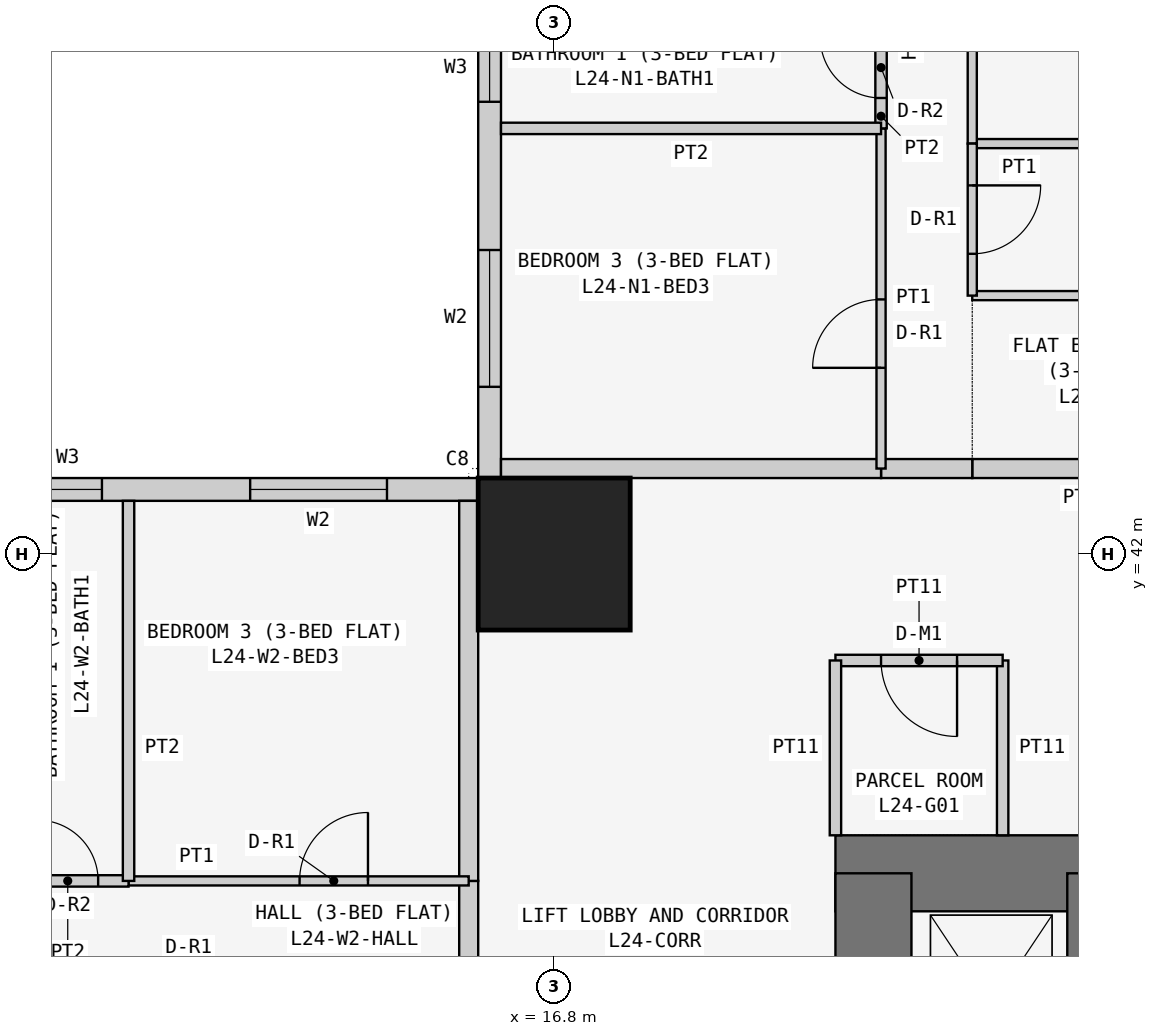
"""IFC4 building model, lengths in metres.
Left out: names, types, materials, properties, quantities, classifications, styles, units other than length and angle.
Written with IfcOpenShell. Run it as: python <this file> out.ifc"""

import sys

from ifc_helpers import new_model, si_unit, direction, frame, frame_2d, origin, origin_2d, place, context, subcontext, project, spatial, rectangle, extrude, element, fill, save


model = new_model("IFC4")
c1 = context("Model", 3, precision=1e-05, world=origin(), true_north=direction((0.0, 1.0)))
c2 = subcontext(c1, "Body", "Model", "MODEL_VIEW")
j1 = project(units=[si_unit("LENGTHUNIT", "METRE"), si_unit("PLANEANGLEUNIT", "RADIAN")], contexts=[c1])
p1 = place(None, origin())
s1 = spatial("IfcSite", under=j1, at=p1, CompositionType="ELEMENT")
p2 = place(p1, origin())
s2 = spatial("IfcBuilding", under=s1, at=p2, CompositionType="ELEMENT")
p3 = place(p2, frame((0.0, 0.0, 95.7)))
s3 = spatial("IfcBuildingStorey", under=s2, at=p3, CompositionType="ELEMENT", Elevation=95.7)
p4 = place(p3, frame((16.8, 42.0, 0.0), z_axis=(0.0, 0.0, 1.0), x_axis=(1.0, 0.0, 0.0)))
e1 = element("IfcColumn", 1, at=p4, inside=s3, PredefinedType="COLUMN", context=c2, shape_type="SweptSolid", body=[
    extrude(rectangle(XDim=2.0, YDim=2.0, at=origin_2d()), origin(), (0.0, 0.0, 1.0), 3.6),
])
p5 = place(p3, frame((37.8, 37.8, 0.0), z_axis=(0.0, 0.0, 1.0), x_axis=(-1.0, 0.0, 0.0)))
e2 = element("IfcWall", 2, at=p5, inside=s3, PredefinedType="SHEAR", context=c2, shape_type="SweptSolid", body=[
    extrude(rectangle(XDim=17.3, YDim=1.0, at=frame_2d((8.65, 0.0))), origin(), (0.0, 0.0, 1.0), 3.6),
])
p6 = place(p3, frame((21.0, 37.8, 0.0), z_axis=(0.0, 0.0, 1.0), x_axis=(0.0, -1.0, 0.0)))
e3 = element("IfcWall", 3, at=p6, inside=s3, PredefinedType="SHEAR", context=c2, shape_type="SweptSolid", body=[
    extrude(rectangle(XDim=17.3, YDim=1.0, at=frame_2d((8.65, 0.0))), origin(), (0.0, 0.0, 1.0), 3.6),
])
p7 = place(p6, frame((5.4, 0.0, 0.0)))
e4 = element("IfcOpeningElement", 4, at=p7, cuts=e3, PredefinedType="OPENING", context=c2, shape_type="SweptSolid", body=[
    extrude(rectangle(XDim=1.2, YDim=2.1, at=frame_2d((0.6, 1.05))), frame((0.0, 0.51, 0.0), z_axis=(0.0, -1.0, 0.0), x_axis=(1.0, 0.0, 0.0)), (0.0, 0.0, 1.0), 1.02),
])
p8 = place(p3, frame((23.8, 34.6, 0.0), z_axis=(0.0, 0.0, 1.0), x_axis=(0.0, 1.0, 0.0)))
e5 = element("IfcWall", 5, at=p8, inside=s3, PredefinedType="SHEAR", context=c2, shape_type="SweptSolid", body=[
    extrude(rectangle(XDim=3.2, YDim=0.5, at=frame_2d((1.6, 0.0))), origin(), (0.0, 0.0, 1.0), 3.6),
])
p9 = place(p3, frame((15.8, 42.85, 0.0), z_axis=(0.0, 0.0, 1.0), x_axis=(-1.0, 0.0, 0.0)))
e6 = element("IfcWall", 6, at=p9, inside=s3, PredefinedType="SOLIDWALL", context=c2, shape_type="SweptSolid", body=[
    extrude(rectangle(XDim=15.4, YDim=0.3, at=frame_2d((7.7, 0.0))), origin(), (0.0, 0.0, 1.0), 3.45),
])
p10 = place(p9, frame((1.2, 0.0, 0.9)))
e7 = element("IfcOpeningElement", 7, at=p10, cuts=e6, PredefinedType="OPENING", context=c2, shape_type="SweptSolid", body=[
    extrude(rectangle(XDim=1.8, YDim=1.5, at=frame_2d((0.9, 0.75))), frame((0.0, 0.16, 0.0), z_axis=(0.0, -1.0, 0.0), x_axis=(1.0, 0.0, 0.0)), (0.0, 0.0, 1.0), 0.32),
])
p11 = place(p9, frame((4.95, 0.0, 1.5)))
e8 = element("IfcOpeningElement", 8, at=p11, cuts=e6, PredefinedType="OPENING", context=c2, shape_type="SweptSolid", body=[
    extrude(rectangle(XDim=0.9, YDim=0.7, at=frame_2d((0.45, 0.35))), frame((0.0, 0.16, 0.0), z_axis=(0.0, -1.0, 0.0), x_axis=(1.0, 0.0, 0.0)), (0.0, 0.0, 1.0), 0.32),
])
p12 = place(p9, frame((8.5, 0.0, 0.9)))
e9 = element("IfcOpeningElement", 9, at=p12, cuts=e6, PredefinedType="OPENING", context=c2, shape_type="SweptSolid", body=[
    extrude(rectangle(XDim=1.8, YDim=1.5, at=frame_2d((0.9, 0.75))), frame((0.0, 0.16, 0.0), z_axis=(0.0, -1.0, 0.0), x_axis=(1.0, 0.0, 0.0)), (0.0, 0.0, 1.0), 0.32),
])
p13 = place(p9, frame((12.5, 0.0, 0.0)))
e10 = element("IfcOpeningElement", 10, at=p13, cuts=e6, PredefinedType="OPENING", context=c2, shape_type="SweptSolid", body=[
    extrude(rectangle(XDim=0.9, YDim=2.4, at=frame_2d((0.45, 1.2))), frame((0.0, 0.16, 0.0), z_axis=(0.0, -1.0, 0.0), x_axis=(1.0, 0.0, 0.0)), (0.0, 0.0, 1.0), 0.32),
])
p14 = place(p9, frame((13.5, 0.0, 0.9)))
e11 = element("IfcOpeningElement", 11, at=p14, cuts=e6, PredefinedType="OPENING", context=c2, shape_type="SweptSolid", body=[
    extrude(rectangle(XDim=1.2, YDim=1.5, at=frame_2d((0.6, 0.75))), frame((0.0, 0.16, 0.0), z_axis=(0.0, -1.0, 0.0), x_axis=(1.0, 0.0, 0.0)), (0.0, 0.0, 1.0), 0.32),
])
p15 = place(p3, frame((15.95, 58.4, 0.0), z_axis=(0.0, 0.0, 1.0), x_axis=(0.0, -1.0, 0.0)))
e12 = element("IfcWall", 12, at=p15, inside=s3, PredefinedType="SOLIDWALL", context=c2, shape_type="SweptSolid", body=[
    extrude(rectangle(XDim=15.7, YDim=0.3, at=frame_2d((7.85, 0.0))), origin(), (0.0, 0.0, 1.0), 3.45),
])
p16 = place(p15, frame((12.4, 0.0, 0.9)))
e13 = element("IfcOpeningElement", 13, at=p16, cuts=e12, PredefinedType="OPENING", context=c2, shape_type="SweptSolid", body=[
    extrude(rectangle(XDim=1.8, YDim=1.5, at=frame_2d((0.9, 0.75))), frame((0.0, 0.16, 0.0), z_axis=(0.0, -1.0, 0.0), x_axis=(1.0, 0.0, 0.0)), (0.0, 0.0, 1.0), 0.32),
])
p17 = place(p15, frame((9.55, 0.0, 1.5)))
e14 = element("IfcOpeningElement", 14, at=p17, cuts=e12, PredefinedType="OPENING", context=c2, shape_type="SweptSolid", body=[
    extrude(rectangle(XDim=0.9, YDim=0.7, at=frame_2d((0.45, 0.35))), frame((0.0, 0.16, 0.0), z_axis=(0.0, -1.0, 0.0), x_axis=(1.0, 0.0, 0.0)), (0.0, 0.0, 1.0), 0.32),
])
p18 = place(p15, frame((5.1, 0.0, 0.9)))
e15 = element("IfcOpeningElement", 15, at=p18, cuts=e12, PredefinedType="OPENING", context=c2, shape_type="SweptSolid", body=[
    extrude(rectangle(XDim=1.8, YDim=1.5, at=frame_2d((0.9, 0.75))), frame((0.0, 0.16, 0.0), z_axis=(0.0, -1.0, 0.0), x_axis=(1.0, 0.0, 0.0)), (0.0, 0.0, 1.0), 0.32),
])
p19 = place(p15, frame((2.0, 0.0, 0.0)))
e16 = element("IfcOpeningElement", 16, at=p19, cuts=e12, PredefinedType="OPENING", context=c2, shape_type="SweptSolid", body=[
    extrude(rectangle(XDim=0.9, YDim=2.4, at=frame_2d((0.45, 1.2))), frame((0.0, 0.16, 0.0), z_axis=(0.0, -1.0, 0.0), x_axis=(1.0, 0.0, 0.0)), (0.0, 0.0, 1.0), 0.32),
])
p20 = place(p15, frame((0.7, 0.0, 0.9)))
e17 = element("IfcOpeningElement", 17, at=p20, cuts=e12, PredefinedType="OPENING", context=c2, shape_type="SweptSolid", body=[
    extrude(rectangle(XDim=1.2, YDim=1.5, at=frame_2d((0.6, 0.75))), frame((0.0, 0.16, 0.0), z_axis=(0.0, -1.0, 0.0), x_axis=(1.0, 0.0, 0.0)), (0.0, 0.0, 1.0), 0.32),
])
p21 = place(p3, frame((22.7, 38.3, 0.0), z_axis=(0.0, 0.0, 1.0), x_axis=(0.0, 1.0, 0.0)))
e18 = element("IfcWall", 18, at=p21, inside=s3, PredefinedType="PARTITIONING", context=c2, shape_type="SweptSolid", body=[
    extrude(rectangle(XDim=2.3, YDim=0.15, at=frame_2d((1.15, 0.0))), origin(), (0.0, 0.0, 1.0), 3.45),
])
p22 = place(p3, frame((22.7, 40.6, 0.0), z_axis=(0.0, 0.0, 1.0), x_axis=(-1.0, 0.0, 0.0)))
e19 = element("IfcWall", 19, at=p22, inside=s3, PredefinedType="PARTITIONING", context=c2, shape_type="SweptSolid", body=[
    extrude(rectangle(XDim=2.2, YDim=0.15, at=frame_2d((1.1, 0.0))), origin(), (0.0, 0.0, 1.0), 3.45),
])
p23 = place(p22, frame((0.6, 0.0, 0.0)))
e20 = element("IfcOpeningElement", 20, at=p23, cuts=e19, PredefinedType="OPENING", context=c2, shape_type="SweptSolid", body=[
    extrude(rectangle(XDim=1.0, YDim=2.1, at=frame_2d((0.5, 1.05))), frame((0.0, 0.085, 0.0), z_axis=(0.0, -1.0, 0.0), x_axis=(1.0, 0.0, 0.0)), (0.0, 0.0, 1.0), 0.17),
])
p24 = place(p3, frame((20.5, 40.6, 0.0), z_axis=(0.0, 0.0, 1.0), x_axis=(0.0, -1.0, 0.0)))
e21 = element("IfcWall", 21, at=p24, inside=s3, PredefinedType="PARTITIONING", context=c2, shape_type="SweptSolid", body=[
    extrude(rectangle(XDim=2.3, YDim=0.15, at=frame_2d((1.15, 0.0))), origin(), (0.0, 0.0, 1.0), 3.45),
])
p25 = place(p3, frame((22.3, 43.125, 0.0), z_axis=(0.0, 0.0, 1.0), x_axis=(1.0, 0.0, 0.0)))
e22 = element("IfcWall", 22, at=p25, inside=s3, PredefinedType="PARTITIONING", context=c2, shape_type="SweptSolid", body=[
    extrude(rectangle(XDim=7.1, YDim=0.25, at=frame_2d((3.55, 0.0))), origin(), (0.0, 0.0, 1.0), 3.45),
])
p26 = place(p25, frame((4.05, 0.0, 0.0)))
e23 = element("IfcOpeningElement", 23, at=p26, cuts=e22, PredefinedType="OPENING", context=c2, shape_type="SweptSolid", body=[
    extrude(rectangle(XDim=1.0, YDim=2.1, at=frame_2d((0.5, 1.05))), frame((0.0, 0.135, 0.0), z_axis=(0.0, -1.0, 0.0), x_axis=(1.0, 0.0, 0.0)), (0.0, 0.0, 1.0), 0.27),
])
p27 = place(p3, frame((21.1, 43.125, 0.0), z_axis=(0.0, 0.0, 1.0), x_axis=(1.0, 0.0, 0.0)))
e24 = element("IfcWall", 24, at=p27, inside=s3, PredefinedType="PARTITIONING", context=c2, shape_type="SweptSolid", body=[
    extrude(rectangle(XDim=1.2, YDim=0.25, at=frame_2d((0.6, 0.0))), origin(), (0.0, 0.0, 1.0), 3.45),
])
p28 = place(p3, frame((16.1, 43.125, 0.0), z_axis=(0.0, 0.0, 1.0), x_axis=(1.0, 0.0, 0.0)))
e25 = element("IfcWall", 25, at=p28, inside=s3, PredefinedType="PARTITIONING", context=c2, shape_type="SweptSolid", body=[
    extrude(rectangle(XDim=5.0, YDim=0.25, at=frame_2d((2.5, 0.0))), origin(), (0.0, 0.0, 1.0), 3.45),
])
p29 = place(p3, frame((15.675, 36.5, 0.0), z_axis=(0.0, 0.0, 1.0), x_axis=(0.0, 1.0, 0.0)))
e26 = element("IfcWall", 26, at=p29, inside=s3, PredefinedType="PARTITIONING", context=c2, shape_type="SweptSolid", body=[
    extrude(rectangle(XDim=1.2, YDim=0.25, at=frame_2d((0.6, 0.0))), origin(), (0.0, 0.0, 1.0), 3.45),
])
p30 = place(p3, frame((15.675, 37.7, 0.0), z_axis=(0.0, 0.0, 1.0), x_axis=(0.0, 1.0, 0.0)))
e27 = element("IfcWall", 27, at=p30, inside=s3, PredefinedType="PARTITIONING", context=c2, shape_type="SweptSolid", body=[
    extrude(rectangle(XDim=5.0, YDim=0.25, at=frame_2d((2.5, 0.0))), origin(), (0.0, 0.0, 1.0), 3.45),
])
for number, where, z_axis, x_axis in (
    (28, (25.4, 45.4, 0.0), (0.0, 0.0, 1.0), (-1.0, 0.0, 0.0)),
    (29, (25.4, 47.4, 0.0), (0.0, 0.0, 1.0), (-1.0, 0.0, 0.0)),
):
    element("IfcWall", number, at=place(p3, frame(where, z_axis=z_axis, x_axis=x_axis)), inside=s3, PredefinedType="PARTITIONING", context=c2, shape_type="SweptSolid", body=[
        extrude(rectangle(XDim=3.1, YDim=0.12, at=frame_2d((1.55, 0.0))), origin(), (0.0, 0.0, 1.0), 3.45),
    ])
p31 = place(p3, frame((22.3, 47.4, 0.0), z_axis=(0.0, 0.0, 1.0), x_axis=(0.0, 1.0, 0.0)))
e30 = element("IfcWall", 30, at=p31, inside=s3, PredefinedType="PARTITIONING", context=c2, shape_type="SweptSolid", body=[
    extrude(rectangle(XDim=3.0, YDim=0.12, at=frame_2d((1.5, 0.0))), origin(), (0.0, 0.0, 1.0), 3.45),
])
p32 = place(p3, frame((22.3, 47.4, 0.0), z_axis=(0.0, 0.0, 1.0), x_axis=(0.0, -1.0, 0.0)))
e31 = element("IfcWall", 31, at=p32, inside=s3, PredefinedType="PARTITIONING", context=c2, shape_type="SweptSolid", body=[
    extrude(rectangle(XDim=2.0, YDim=0.12, at=frame_2d((1.0, 0.0))), origin(), (0.0, 0.0, 1.0), 3.45),
])
p33 = place(p32, frame((0.55, 0.0, 0.0)))
e32 = element("IfcOpeningElement", 32, at=p33, cuts=e31, PredefinedType="OPENING", context=c2, shape_type="SweptSolid", body=[
    extrude(rectangle(XDim=0.9, YDim=2.1, at=frame_2d((0.45, 1.05))), frame((0.0, 0.07, 0.0), z_axis=(0.0, -1.0, 0.0), x_axis=(1.0, 0.0, 0.0)), (0.0, 0.0, 1.0), 0.14),
])
p34 = place(p3, frame((21.1, 47.6, 0.0), z_axis=(0.0, 0.0, 1.0), x_axis=(0.0, -1.0, 0.0)))
e33 = element("IfcWall", 33, at=p34, inside=s3, PredefinedType="PARTITIONING", context=c2, shape_type="SweptSolid", body=[
    extrude(rectangle(XDim=4.475, YDim=0.12, at=frame_2d((2.238, 0.0))), origin(), (0.0, 0.0, 1.0), 3.45),
])
p35 = place(p34, frame((2.25, 0.0, 0.0)))
e34 = element("IfcOpeningElement", 34, at=p35, cuts=e33, PredefinedType="OPENING", context=c2, shape_type="SweptSolid", body=[
    extrude(rectangle(XDim=0.9, YDim=2.1, at=frame_2d((0.45, 1.05))), frame((0.0, 0.07, 0.0), z_axis=(0.0, -1.0, 0.0), x_axis=(1.0, 0.0, 0.0)), (0.0, 0.0, 1.0), 0.14),
])
p36 = place(p3, frame((21.1, 49.2, 0.0), z_axis=(0.0, 0.0, 1.0), x_axis=(0.0, -1.0, 0.0)))
e35 = element("IfcWall", 35, at=p36, inside=s3, PredefinedType="PARTITIONING", context=c2, shape_type="SweptSolid", body=[
    extrude(rectangle(XDim=1.6, YDim=0.15, at=frame_2d((0.8, 0.0))), origin(), (0.0, 0.0, 1.0), 3.45),
])
p37 = place(p36, frame((0.4, 0.0, 0.0)))
e36 = element("IfcOpeningElement", 36, at=p37, cuts=e35, PredefinedType="OPENING", context=c2, shape_type="SweptSolid", body=[
    extrude(rectangle(XDim=0.8, YDim=2.1, at=frame_2d((0.4, 1.05))), frame((0.0, 0.085, 0.0), z_axis=(0.0, -1.0, 0.0), x_axis=(1.0, 0.0, 0.0)), (0.0, 0.0, 1.0), 0.17),
])
p38 = place(p3, frame((21.1, 47.6, 0.0), z_axis=(0.0, 0.0, 1.0), x_axis=(-1.0, 0.0, 0.0)))
e37 = element("IfcWall", 37, at=p38, inside=s3, PredefinedType="PARTITIONING", context=c2, shape_type="SweptSolid", body=[
    extrude(rectangle(XDim=5.0, YDim=0.15, at=frame_2d((2.5, 0.0))), origin(), (0.0, 0.0, 1.0), 3.45),
])
p39 = place(p3, frame((11.2, 37.7, 0.0), z_axis=(0.0, 0.0, 1.0), x_axis=(1.0, 0.0, 0.0)))
e38 = element("IfcWall", 38, at=p39, inside=s3, PredefinedType="PARTITIONING", context=c2, shape_type="SweptSolid", body=[
    extrude(rectangle(XDim=4.475, YDim=0.12, at=frame_2d((2.238, 0.0))), origin(), (0.0, 0.0, 1.0), 3.45),
])
p40 = place(p39, frame((2.25, 0.0, 0.0)))
e39 = element("IfcOpeningElement", 39, at=p40, cuts=e38, PredefinedType="OPENING", context=c2, shape_type="SweptSolid", body=[
    extrude(rectangle(XDim=0.9, YDim=2.1, at=frame_2d((0.45, 1.05))), frame((0.0, 0.07, 0.0), z_axis=(0.0, -1.0, 0.0), x_axis=(1.0, 0.0, 0.0)), (0.0, 0.0, 1.0), 0.14),
])
p41 = place(p3, frame((9.6, 37.7, 0.0), z_axis=(0.0, 0.0, 1.0), x_axis=(1.0, 0.0, 0.0)))
e40 = element("IfcWall", 40, at=p41, inside=s3, PredefinedType="PARTITIONING", context=c2, shape_type="SweptSolid", body=[
    extrude(rectangle(XDim=1.6, YDim=0.15, at=frame_2d((0.8, 0.0))), origin(), (0.0, 0.0, 1.0), 3.45),
])
p42 = place(p41, frame((0.4, 0.0, 0.0)))
e41 = element("IfcOpeningElement", 41, at=p42, cuts=e40, PredefinedType="OPENING", context=c2, shape_type="SweptSolid", body=[
    extrude(rectangle(XDim=0.8, YDim=2.1, at=frame_2d((0.4, 1.05))), frame((0.0, 0.085, 0.0), z_axis=(0.0, -1.0, 0.0), x_axis=(1.0, 0.0, 0.0)), (0.0, 0.0, 1.0), 0.17),
])
p43 = place(p3, frame((11.2, 37.7, 0.0), z_axis=(0.0, 0.0, 1.0), x_axis=(0.0, 1.0, 0.0)))
e42 = element("IfcWall", 42, at=p43, inside=s3, PredefinedType="PARTITIONING", context=c2, shape_type="SweptSolid", body=[
    extrude(rectangle(XDim=5.0, YDim=0.15, at=frame_2d((2.5, 0.0))), origin(), (0.0, 0.0, 1.0), 3.45),
])
p44 = place(p16, origin())
e43 = element("IfcWindow", 43, at=p44, inside=s3, PartitioningType="SINGLE_PANEL", PredefinedType="WINDOW", context=c2, shape_type="SweptSolid", body=[
    extrude(rectangle(XDim=1.8, YDim=1.5, at=frame_2d((0.9, 0.75))), frame((0.0, 0.03, 0.0), z_axis=(0.0, -1.0, 0.0), x_axis=(1.0, 0.0, 0.0)), (0.0, 0.0, 1.0), 0.06),
])
fill(e13, e43)
p45 = place(p17, origin())
e44 = element("IfcWindow", 44, at=p45, inside=s3, PartitioningType="SINGLE_PANEL", PredefinedType="WINDOW", context=c2, shape_type="SweptSolid", body=[
    extrude(rectangle(XDim=0.9, YDim=0.7, at=frame_2d((0.45, 0.35))), frame((0.0, 0.03, 0.0), z_axis=(0.0, -1.0, 0.0), x_axis=(1.0, 0.0, 0.0)), (0.0, 0.0, 1.0), 0.06),
])
fill(e14, e44)
p46 = place(p10, origin())
e45 = element("IfcWindow", 45, at=p46, inside=s3, PartitioningType="SINGLE_PANEL", PredefinedType="WINDOW", context=c2, shape_type="SweptSolid", body=[
    extrude(rectangle(XDim=1.8, YDim=1.5, at=frame_2d((0.9, 0.75))), frame((0.0, 0.03, 0.0), z_axis=(0.0, -1.0, 0.0), x_axis=(1.0, 0.0, 0.0)), (0.0, 0.0, 1.0), 0.06),
])
fill(e7, e45)
p47 = place(p11, origin())
e46 = element("IfcWindow", 46, at=p47, inside=s3, PartitioningType="SINGLE_PANEL", PredefinedType="WINDOW", context=c2, shape_type="SweptSolid", body=[
    extrude(rectangle(XDim=0.9, YDim=0.7, at=frame_2d((0.45, 0.35))), frame((0.0, 0.03, 0.0), z_axis=(0.0, -1.0, 0.0), x_axis=(1.0, 0.0, 0.0)), (0.0, 0.0, 1.0), 0.06),
])
fill(e8, e46)
p48 = place(p23, origin())
e47 = element("IfcDoor", 47, at=p48, inside=s3, OperationType="SINGLE_SWING_LEFT", PredefinedType="DOOR", context=c2, shape_type="SweptSolid", body=[
    extrude(rectangle(XDim=1.0, YDim=2.1, at=frame_2d((0.5, 1.05))), frame((0.0, 0.025, 0.0), z_axis=(0.0, -1.0, 0.0), x_axis=(1.0, 0.0, 0.0)), (0.0, 0.0, 1.0), 0.05),
])
fill(e20, e47)
p49 = place(p33, origin())
e48 = element("IfcDoor", 48, at=p49, inside=s3, OperationType="SINGLE_SWING_LEFT", PredefinedType="DOOR", context=c2, shape_type="SweptSolid", body=[
    extrude(rectangle(XDim=0.9, YDim=2.1, at=frame_2d((0.45, 1.05))), frame((0.0, 0.025, 0.0), z_axis=(0.0, -1.0, 0.0), x_axis=(1.0, 0.0, 0.0)), (0.0, 0.0, 1.0), 0.05),
])
fill(e32, e48)
p50 = place(p35, frame((0.9, 0.0, 0.0), z_axis=(0.0, 0.0, 1.0), x_axis=(-1.0, 0.0, 0.0)))
e49 = element("IfcDoor", 49, at=p50, inside=s3, OperationType="SINGLE_SWING_LEFT", PredefinedType="DOOR", context=c2, shape_type="SweptSolid", body=[
    extrude(rectangle(XDim=0.9, YDim=2.1, at=frame_2d((0.45, 1.05))), frame((0.0, 0.025, 0.0), z_axis=(0.0, -1.0, 0.0), x_axis=(1.0, 0.0, 0.0)), (0.0, 0.0, 1.0), 0.05),
])
fill(e34, e49)
p51 = place(p37, frame((0.8, 0.0, 0.0), z_axis=(0.0, 0.0, 1.0), x_axis=(-1.0, 0.0, 0.0)))
e50 = element("IfcDoor", 50, at=p51, inside=s3, OperationType="SINGLE_SWING_RIGHT", PredefinedType="DOOR", context=c2, shape_type="SweptSolid", body=[
    extrude(rectangle(XDim=0.8, YDim=2.1, at=frame_2d((0.4, 1.05))), frame((0.0, 0.025, 0.0), z_axis=(0.0, -1.0, 0.0), x_axis=(1.0, 0.0, 0.0)), (0.0, 0.0, 1.0), 0.05),
])
fill(e36, e50)
p52 = place(p40, origin())
e51 = element("IfcDoor", 51, at=p52, inside=s3, OperationType="SINGLE_SWING_RIGHT", PredefinedType="DOOR", context=c2, shape_type="SweptSolid", body=[
    extrude(rectangle(XDim=0.9, YDim=2.1, at=frame_2d((0.45, 1.05))), frame((0.0, 0.025, 0.0), z_axis=(0.0, -1.0, 0.0), x_axis=(1.0, 0.0, 0.0)), (0.0, 0.0, 1.0), 0.05),
])
fill(e39, e51)
p53 = place(p42, origin())
e52 = element("IfcDoor", 52, at=p53, inside=s3, OperationType="SINGLE_SWING_LEFT", PredefinedType="DOOR", context=c2, shape_type="SweptSolid", body=[
    extrude(rectangle(XDim=0.8, YDim=2.1, at=frame_2d((0.4, 1.05))), frame((0.0, 0.025, 0.0), z_axis=(0.0, -1.0, 0.0), x_axis=(1.0, 0.0, 0.0)), (0.0, 0.0, 1.0), 0.05),
])
fill(e41, e52)
save(model, sys.argv[1])
